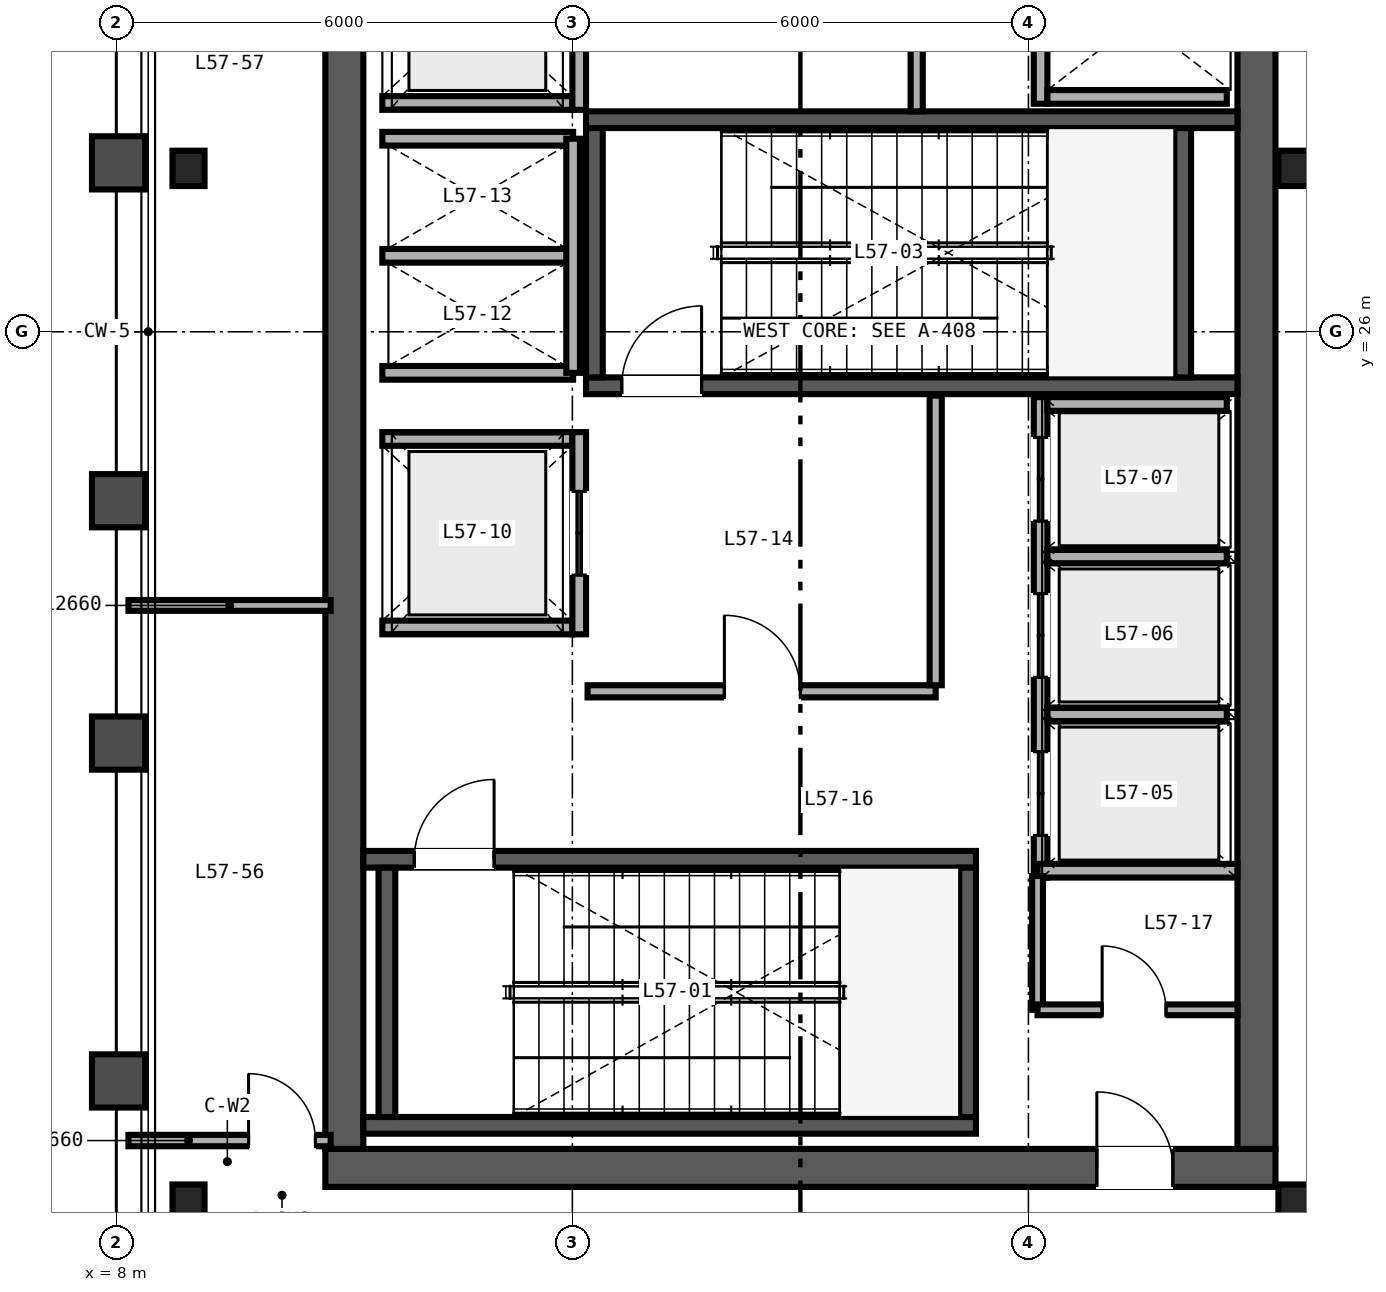
"""IFC4 building model, lengths in metres.
Left out: names, types, materials, properties, quantities, classifications, styles, units other than length and angle.
Written with IfcOpenShell. Run it as: python <this file> out.ifc"""

import sys

from ifc_helpers import new_model, si_unit, direction, frame, frame_2d, origin, origin_2d, place, context, subcontext, project, spatial, rectangle, i_section, extrude, source, transform, mapped, element, fill, save


model = new_model("IFC4")
c1 = context("Model", 3, precision=1e-05, world=origin(), true_north=direction((0.0, 1.0)))
c2 = subcontext(c1, "Body", "Model", "MODEL_VIEW")
j1 = project(units=[si_unit("LENGTHUNIT", "METRE"), si_unit("PLANEANGLEUNIT", "RADIAN")], contexts=[c1])
p1 = place(None, origin())
s1 = spatial("IfcSite", under=j1, at=p1, CompositionType="ELEMENT")
p2 = place(p1, origin())
s2 = spatial("IfcBuilding", under=s1, at=p2, CompositionType="ELEMENT")
p3 = place(p2, frame((0.0, 0.0, 228.0)))
s3 = spatial("IfcBuildingStorey", under=s2, at=p3, CompositionType="ELEMENT", Elevation=228.0)
p4 = place(p3, frame((10.75, 15.0, 0.0), z_axis=(0.0, 0.0, 1.0), x_axis=(1.0, 0.0, 0.0)))
e1 = element("IfcWall", 1, at=p4, inside=s3, PredefinedType="SHEAR", context=c2, shape_type="SweptSolid", body=[
    extrude(rectangle(XDim=12.5, YDim=0.5, at=frame_2d((6.25, 0.0))), origin(), (0.0, 0.0, 1.0), 4.58),
])
p5 = place(p4, frame((10.15, 0.0, 0.0)))
e2 = element("IfcOpeningElement", 2, at=p5, cuts=e1, PredefinedType="OPENING", context=c2, shape_type="SweptSolid", body=[
    extrude(rectangle(XDim=1.0, YDim=2.15, at=frame_2d((0.5, 1.075))), frame((0.0, 0.26, 0.0), z_axis=(0.0, -1.0, 0.0), x_axis=(1.0, 0.0, 0.0)), (0.0, 0.0, 1.0), 0.52),
])
for number, where, z_axis, x_axis in (
    (3, (11.0, 15.25, 0.0), (0.0, 0.0, 1.0), (0.0, 1.0, 0.0)),
    (4, (23.0, 15.25, 0.0), (0.0, 0.0, 1.0), (0.0, 1.0, 0.0)),
):
    element("IfcWall", number, at=place(p3, frame(where, z_axis=z_axis, x_axis=x_axis)), inside=s3, PredefinedType="SHEAR", context=c2, shape_type="SweptSolid", body=[
        extrude(rectangle(XDim=21.5, YDim=0.5, at=frame_2d((10.75, 0.0))), origin(), (0.0, 0.0, 1.0), 4.58),
    ])
p6 = place(p3, frame((11.25, 15.56, 0.0), z_axis=(0.0, 0.0, 1.0), x_axis=(1.0, 0.0, 0.0)))
e5 = element("IfcWall", 5, at=p6, inside=s3, PredefinedType="SHEAR", context=c2, shape_type="SweptSolid", body=[
    extrude(rectangle(XDim=8.06, YDim=0.22, at=frame_2d((4.03, 0.0))), origin(), (0.0, 0.0, 1.0), 4.6),
])
p7 = place(p3, frame((11.25, 19.06, 0.0), z_axis=(0.0, 0.0, 1.0), x_axis=(1.0, 0.0, 0.0)))
e6 = element("IfcWall", 6, at=p7, inside=s3, PredefinedType="SHEAR", context=c2, shape_type="SweptSolid", body=[
    extrude(rectangle(XDim=8.06, YDim=0.22, at=frame_2d((4.03, 0.0))), origin(), (0.0, 0.0, 1.0), 4.6),
])
p8 = place(p7, frame((0.67, 0.0, 0.0)))
e7 = element("IfcOpeningElement", 7, at=p8, cuts=e6, PredefinedType="OPENING", context=c2, shape_type="SweptSolid", body=[
    extrude(rectangle(XDim=1.05, YDim=2.15, at=frame_2d((0.525, 1.075))), frame((0.0, 0.12, 0.0), z_axis=(0.0, -1.0, 0.0), x_axis=(1.0, 0.0, 0.0)), (0.0, 0.0, 1.0), 0.24),
])
for number, where, z_axis, x_axis in (
    (8, (11.56, 15.67, 0.0), (0.0, 0.0, 1.0), (0.0, 1.0, 0.0)),
    (9, (19.2, 15.67, 0.0), (0.0, 0.0, 1.0), (0.0, 1.0, 0.0)),
):
    element("IfcWall", number, at=place(p3, frame(where, z_axis=z_axis, x_axis=x_axis)), inside=s3, PredefinedType="SHEAR", context=c2, shape_type="SweptSolid", body=[
        extrude(rectangle(XDim=3.28, YDim=0.22, at=frame_2d((1.64, 0.0))), origin(), (0.0, 0.0, 1.0), 4.6),
    ])
p9 = place(p3, frame((14.18, 25.29, 0.0), z_axis=(0.0, 0.0, 1.0), x_axis=(1.0, 0.0, 0.0)))
e10 = element("IfcWall", 10, at=p9, inside=s3, PredefinedType="SHEAR", context=c2, shape_type="SweptSolid", body=[
    extrude(rectangle(XDim=8.57, YDim=0.22, at=frame_2d((4.285, 0.0))), origin(), (0.0, 0.0, 1.0), 4.6),
])
p10 = place(p9, frame((0.47, 0.0, 0.0)))
e11 = element("IfcOpeningElement", 11, at=p10, cuts=e10, PredefinedType="OPENING", context=c2, shape_type="SweptSolid", body=[
    extrude(rectangle(XDim=1.05, YDim=2.15, at=frame_2d((0.525, 1.075))), frame((0.0, 0.12, 0.0), z_axis=(0.0, -1.0, 0.0), x_axis=(1.0, 0.0, 0.0)), (0.0, 0.0, 1.0), 0.24),
])
p11 = place(p3, frame((14.18, 28.79, 0.0), z_axis=(0.0, 0.0, 1.0), x_axis=(1.0, 0.0, 0.0)))
e12 = element("IfcWall", 12, at=p11, inside=s3, PredefinedType="SHEAR", context=c2, shape_type="SweptSolid", body=[
    extrude(rectangle(XDim=8.57, YDim=0.22, at=frame_2d((4.285, 0.0))), origin(), (0.0, 0.0, 1.0), 4.6),
])
for number, where, z_axis, x_axis in (
    (13, (14.29, 25.4, 0.0), (0.0, 0.0, 1.0), (0.0, 1.0, 0.0)),
    (14, (22.03, 25.4, 0.0), (0.0, 0.0, 1.0), (0.0, 1.0, 0.0)),
):
    element("IfcWall", number, at=place(p3, frame(where, z_axis=z_axis, x_axis=x_axis)), inside=s3, PredefinedType="SHEAR", context=c2, shape_type="SweptSolid", body=[
        extrude(rectangle(XDim=3.28, YDim=0.22, at=frame_2d((1.64, 0.0))), origin(), (0.0, 0.0, 1.0), 4.6),
    ])
m1 = source(origin(), c2, "Body", "SweptSolid", [
    extrude(i_section(OverallWidth=0.422, OverallDepth=0.465, WebThickness=0.045, FlangeThickness=0.073, FilletRadius=0.025, at=origin_2d()), origin(), (0.0, 0.0, 1.0), 4.58),
])
for number, where, z_axis, x_axis in (
    (15, (8.95, 14.55, 0.0), (0.0, 0.0, 1.0), (1.0, 0.0, 0.0)),
    (16, (23.5, 14.55, 0.0), (0.0, 0.0, 1.0), (1.0, 0.0, 0.0)),
    (17, (8.95, 28.15, 0.0), (0.0, 0.0, 1.0), (1.0, 0.0, 0.0)),
    (18, (23.5, 28.15, 0.0), (0.0, 0.0, 1.0), (1.0, 0.0, 0.0)),
):
    element("IfcColumn", number, at=place(p3, frame(where, z_axis=z_axis, x_axis=x_axis)), inside=s3, PredefinedType="COLUMN", context=c2, shape_type="MappedRepresentation", body=[
        mapped(m1, transform((0.0, 0.0, 0.0), scale=1.0)),
    ])
p12 = place(p3, frame((20.16, 18.82, 0.0), z_axis=(0.0, 0.0, 1.0), x_axis=(0.0, 1.0, 0.0)))
e19 = element("IfcWall", 19, at=p12, inside=s3, PredefinedType="SOLIDWALL", context=c2, shape_type="SweptSolid", body=[
    extrude(rectangle(XDim=6.32, YDim=0.18, at=frame_2d((3.16, 0.0))), origin(), (0.0, 0.0, 1.0), 3.68),
])
p13 = place(p12, frame((0.555, 0.0, 0.0)))
e20 = element("IfcOpeningElement", 20, at=p13, cuts=e19, PredefinedType="OPENING", context=c2, shape_type="SweptSolid", body=[
    extrude(rectangle(XDim=1.1, YDim=2.2, at=frame_2d((0.55, 1.1))), frame((0.0, 0.1, 0.0), z_axis=(0.0, -1.0, 0.0), x_axis=(1.0, 0.0, 0.0)), (0.0, 0.0, 1.0), 0.2),
])
p14 = place(p12, frame((2.635, 0.0, 0.0)))
e21 = element("IfcOpeningElement", 21, at=p14, cuts=e19, PredefinedType="OPENING", context=c2, shape_type="SweptSolid", body=[
    extrude(rectangle(XDim=1.1, YDim=2.2, at=frame_2d((0.55, 1.1))), frame((0.0, 0.1, 0.0), z_axis=(0.0, -1.0, 0.0), x_axis=(1.0, 0.0, 0.0)), (0.0, 0.0, 1.0), 0.2),
])
p15 = place(p12, frame((4.69, 0.0, 0.0)))
e22 = element("IfcOpeningElement", 22, at=p15, cuts=e19, PredefinedType="OPENING", context=c2, shape_type="SweptSolid", body=[
    extrude(rectangle(XDim=1.1, YDim=2.2, at=frame_2d((0.55, 1.1))), frame((0.0, 0.1, 0.0), z_axis=(0.0, -1.0, 0.0), x_axis=(1.0, 0.0, 0.0)), (0.0, 0.0, 1.0), 0.2),
])
p16 = place(p3, frame((20.12, 18.91, 0.0), z_axis=(0.0, 0.0, 1.0), x_axis=(1.0, 0.0, 0.0)))
e23 = element("IfcWall", 23, at=p16, inside=s3, PredefinedType="SOLIDWALL", context=c2, shape_type="SweptSolid", body=[
    extrude(rectangle(XDim=2.63, YDim=0.18, at=frame_2d((1.315, 0.0))), origin(), (0.0, 0.0, 1.0), 4.58),
])
p17 = place(p3, frame((20.25, 25.05, 0.0), z_axis=(0.0, 0.0, 1.0), x_axis=(1.0, 0.0, 0.0)))
e24 = element("IfcWall", 24, at=p17, inside=s3, PredefinedType="SOLIDWALL", context=c2, shape_type="SweptSolid", body=[
    extrude(rectangle(XDim=2.36, YDim=0.18, at=frame_2d((1.18, 0.0))), origin(), (0.0, 0.0, 1.0), 4.58),
])
p18 = place(p3, frame((20.25, 20.965, 0.0), z_axis=(0.0, 0.0, 1.0), x_axis=(1.0, 0.0, 0.0)))
e25 = element("IfcWall", 25, at=p18, inside=s3, PredefinedType="SOLIDWALL", context=c2, shape_type="SweptSolid", body=[
    extrude(rectangle(XDim=2.36, YDim=0.18, at=frame_2d((1.18, 0.0))), origin(), (0.0, 0.0, 1.0), 3.68),
])
p19 = place(p3, frame((20.25, 23.045, 0.0), z_axis=(0.0, 0.0, 1.0), x_axis=(1.0, 0.0, 0.0)))
e26 = element("IfcWall", 26, at=p19, inside=s3, PredefinedType="SOLIDWALL", context=c2, shape_type="SweptSolid", body=[
    extrude(rectangle(XDim=2.36, YDim=0.18, at=frame_2d((1.18, 0.0))), origin(), (0.0, 0.0, 1.0), 4.58),
])
p20 = place(p3, frame((20.16, 29.0, 0.0), z_axis=(0.0, 0.0, 1.0), x_axis=(0.0, 1.0, 0.0)))
e27 = element("IfcWall", 27, at=p20, inside=s3, PredefinedType="SOLIDWALL", context=c2, shape_type="SweptSolid", body=[
    extrude(rectangle(XDim=4.29, YDim=0.18, at=frame_2d((2.145, 0.0))), origin(), (0.0, 0.0, 1.0), 4.58),
])
p21 = place(p3, frame((20.25, 29.09, 0.0), z_axis=(0.0, 0.0, 1.0), x_axis=(1.0, 0.0, 0.0)))
e28 = element("IfcWall", 28, at=p21, inside=s3, PredefinedType="SOLIDWALL", context=c2, shape_type="SweptSolid", body=[
    extrude(rectangle(XDim=2.36, YDim=0.18, at=frame_2d((1.18, 0.0))), origin(), (0.0, 0.0, 1.0), 4.58),
])
for number, where, z_axis, x_axis in (
    (29, (11.5, 22.11, 0.0), (0.0, 0.0, 1.0), (1.0, 0.0, 0.0)),
    (30, (11.5, 24.59, 0.0), (0.0, 0.0, 1.0), (1.0, 0.0, 0.0)),
):
    element("IfcWall", number, at=place(p3, frame(where, z_axis=z_axis, x_axis=x_axis)), inside=s3, PredefinedType="SOLIDWALL", context=c2, shape_type="SweptSolid", body=[
        extrude(rectangle(XDim=2.5, YDim=0.18, at=frame_2d((1.25, 0.0))), origin(), (0.0, 0.0, 1.0), 4.58),
    ])
p22 = place(p3, frame((14.09, 22.02, 0.0), z_axis=(0.0, 0.0, 1.0), x_axis=(0.0, 1.0, 0.0)))
e31 = element("IfcWall", 31, at=p22, inside=s3, PredefinedType="SOLIDWALL", context=c2, shape_type="SweptSolid", body=[
    extrude(rectangle(XDim=2.66, YDim=0.18, at=frame_2d((1.33, 0.0))), origin(), (0.0, 0.0, 1.0), 4.58),
])
p23 = place(p22, frame((0.78, 0.0, 0.0)))
e32 = element("IfcOpeningElement", 32, at=p23, cuts=e31, PredefinedType="OPENING", context=c2, shape_type="SweptSolid", body=[
    extrude(rectangle(XDim=1.1, YDim=2.2, at=frame_2d((0.55, 1.1))), frame((0.0, 0.1, 0.0), z_axis=(0.0, -1.0, 0.0), x_axis=(1.0, 0.0, 0.0)), (0.0, 0.0, 1.0), 0.2),
])
p24 = place(p3, frame((11.5, 29.01, 0.0), z_axis=(0.0, 0.0, 1.0), x_axis=(1.0, 0.0, 0.0)))
e33 = element("IfcWall", 33, at=p24, inside=s3, PredefinedType="SOLIDWALL", context=c2, shape_type="SweptSolid", body=[
    extrude(rectangle(XDim=2.5, YDim=0.18, at=frame_2d((1.25, 0.0))), origin(), (0.0, 0.0, 1.0), 4.58),
])
p25 = place(p3, frame((14.09, 28.92, 0.0), z_axis=(0.0, 0.0, 1.0), x_axis=(0.0, 1.0, 0.0)))
e34 = element("IfcWall", 34, at=p25, inside=s3, PredefinedType="SOLIDWALL", context=c2, shape_type="SweptSolid", body=[
    extrude(rectangle(XDim=2.66, YDim=0.18, at=frame_2d((1.33, 0.0))), origin(), (0.0, 0.0, 1.0), 4.58),
])
p26 = place(p25, frame((0.78, 0.0, 0.0)))
e35 = element("IfcOpeningElement", 35, at=p26, cuts=e34, PredefinedType="OPENING", context=c2, shape_type="SweptSolid", body=[
    extrude(rectangle(XDim=1.1, YDim=2.2, at=frame_2d((0.55, 1.1))), frame((0.0, 0.1, 0.0), z_axis=(0.0, -1.0, 0.0), x_axis=(1.0, 0.0, 0.0)), (0.0, 0.0, 1.0), 0.2),
])
for number, where, z_axis, x_axis in (
    (36, (11.5, 25.46, 0.0), (0.0, 0.0, 1.0), (1.0, 0.0, 0.0)),
    (37, (11.5, 27.0, 0.0), (0.0, 0.0, 1.0), (1.0, 0.0, 0.0)),
    (38, (11.5, 28.54, 0.0), (0.0, 0.0, 1.0), (1.0, 0.0, 0.0)),
):
    element("IfcWall", number, at=place(p3, frame(where, z_axis=z_axis, x_axis=x_axis)), inside=s3, PredefinedType="SOLIDWALL", context=c2, shape_type="SweptSolid", body=[
        extrude(rectangle(XDim=2.51, YDim=0.18, at=frame_2d((1.255, 0.0))), origin(), (0.0, 0.0, 1.0), 4.58),
    ])
p27 = place(p3, frame((14.01, 25.46, 0.0), z_axis=(0.0, 0.0, 1.0), x_axis=(0.0, 1.0, 0.0)))
e39 = element("IfcWall", 39, at=p27, inside=s3, PredefinedType="SOLIDWALL", context=c2, shape_type="SweptSolid", body=[
    extrude(rectangle(XDim=3.08, YDim=0.18, at=frame_2d((1.54, 0.0))), origin(), (0.0, 0.0, 1.0), 4.58),
])
p28 = place(p3, frame((14.2, 21.27, 0.0), z_axis=(0.0, 0.0, 1.0), x_axis=(1.0, 0.0, 0.0)))
e40 = element("IfcWall", 40, at=p28, inside=s3, PredefinedType="PARTITIONING", context=c2, shape_type="SweptSolid", body=[
    extrude(rectangle(XDim=4.58, YDim=0.16, at=frame_2d((2.29, 0.0))), origin(), (0.0, 0.0, 1.0), 4.58),
])
p29 = place(p28, frame((1.8, 0.0, 0.0)))
e41 = element("IfcOpeningElement", 41, at=p29, cuts=e40, PredefinedType="OPENING", context=c2, shape_type="SweptSolid", body=[
    extrude(rectangle(XDim=1.0, YDim=2.15, at=frame_2d((0.5, 1.075))), frame((0.0, 0.09, 0.0), z_axis=(0.0, -1.0, 0.0), x_axis=(1.0, 0.0, 0.0)), (0.0, 0.0, 1.0), 0.18),
])
p30 = place(p3, frame((18.78, 21.35, 0.0), z_axis=(0.0, 0.0, 1.0), x_axis=(0.0, 1.0, 0.0)))
e42 = element("IfcWall", 42, at=p30, inside=s3, PredefinedType="PARTITIONING", context=c2, shape_type="SweptSolid", body=[
    extrude(rectangle(XDim=3.81, YDim=0.16, at=frame_2d((1.905, 0.0))), origin(), (0.0, 0.0, 1.0), 4.58),
])
p31 = place(p3, frame((18.53, 28.9, 0.0), z_axis=(0.0, 0.0, 1.0), x_axis=(0.0, 1.0, 0.0)))
e43 = element("IfcWall", 43, at=p31, inside=s3, PredefinedType="PARTITIONING", context=c2, shape_type="SweptSolid", body=[
    extrude(rectangle(XDim=3.9, YDim=0.16, at=frame_2d((1.95, 0.0))), origin(), (0.0, 0.0, 1.0), 4.58),
])
p32 = place(p31, frame((1.5, 0.0, 0.0)))
e44 = element("IfcOpeningElement", 44, at=p32, cuts=e43, PredefinedType="OPENING", context=c2, shape_type="SweptSolid", body=[
    extrude(rectangle(XDim=1.0, YDim=2.15, at=frame_2d((0.5, 1.075))), frame((0.0, 0.09, 0.0), z_axis=(0.0, -1.0, 0.0), x_axis=(1.0, 0.0, 0.0)), (0.0, 0.0, 1.0), 0.18),
])
p33 = place(p3, frame((20.12, 17.08, 0.0), z_axis=(0.0, 0.0, 1.0), x_axis=(0.0, 1.0, 0.0)))
e45 = element("IfcWall", 45, at=p33, inside=s3, PredefinedType="PARTITIONING", context=c2, shape_type="SweptSolid", body=[
    extrude(rectangle(XDim=1.76, YDim=0.142, at=frame_2d((0.88, 0.0))), origin(), (0.0, 0.0, 1.0), 4.58),
])
p34 = place(p3, frame((20.12, 17.08, 0.0), z_axis=(0.0, 0.0, 1.0), x_axis=(1.0, 0.0, 0.0)))
e46 = element("IfcWall", 46, at=p34, inside=s3, PredefinedType="PARTITIONING", context=c2, shape_type="SweptSolid", body=[
    extrude(rectangle(XDim=2.63, YDim=0.142, at=frame_2d((1.315, 0.0))), origin(), (0.0, 0.0, 1.0), 4.58),
])
p35 = place(p34, frame((0.85, 0.0, 0.0)))
e47 = element("IfcOpeningElement", 47, at=p35, cuts=e46, PredefinedType="OPENING", context=c2, shape_type="SweptSolid", body=[
    extrude(rectangle(XDim=0.84, YDim=2.1, at=frame_2d((0.42, 1.05))), frame((0.0, 0.081, 0.0), z_axis=(0.0, -1.0, 0.0), x_axis=(1.0, 0.0, 0.0)), (0.0, 0.0, 1.0), 0.162),
])
p36 = place(p3, frame((8.16, 15.36, 0.0), z_axis=(0.0, 0.0, 1.0), x_axis=(1.0, 0.0, 0.0)))
e48 = element("IfcWall", 48, at=p36, inside=s3, PredefinedType="PARTITIONING", context=c2, shape_type="SweptSolid", body=[
    extrude(rectangle(XDim=2.66, YDim=0.15, at=frame_2d((1.33, 0.0))), origin(), (0.0, 0.0, 1.0), 3.801),
])
p37 = place(p36, frame((1.58, 0.0, 0.0)))
e49 = element("IfcOpeningElement", 49, at=p37, cuts=e48, PredefinedType="OPENING", context=c2, shape_type="SweptSolid", body=[
    extrude(rectangle(XDim=0.88, YDim=2.15, at=frame_2d((0.44, 1.075))), frame((0.0, 0.085, 0.0), z_axis=(0.0, -1.0, 0.0), x_axis=(1.0, 0.0, 0.0)), (0.0, 0.0, 1.0), 0.17),
])
p38 = place(p3, frame((8.16, 22.4, 0.0), z_axis=(0.0, 0.0, 1.0), x_axis=(1.0, 0.0, 0.0)))
e50 = element("IfcWall", 50, at=p38, inside=s3, PredefinedType="PARTITIONING", context=c2, shape_type="SweptSolid", body=[
    extrude(rectangle(XDim=2.66, YDim=0.142, at=frame_2d((1.33, 0.0))), origin(), (0.0, 0.0, 1.0), 3.801),
])
m2 = source(origin(), c2, "Body", "SweptSolid", [
    extrude(rectangle(XDim=1.05, YDim=2.15, at=frame_2d((0.525, 1.075))), frame((0.0, 0.025, 0.0), z_axis=(0.0, -1.0, 0.0), x_axis=(1.0, 0.0, 0.0)), (0.0, 0.0, 1.0), 0.05),
])
p39 = place(p8, origin())
e51 = element("IfcDoor", 51, at=p39, inside=s3, OperationType="SINGLE_SWING_RIGHT", PredefinedType="DOOR", context=c2, shape_type="MappedRepresentation", body=[
    mapped(m2, transform((0.0, 0.0, 0.0), scale=1.0)),
])
fill(e7, e51)
p40 = place(p10, origin())
e52 = element("IfcDoor", 52, at=p40, inside=s3, OperationType="SINGLE_SWING_RIGHT", PredefinedType="DOOR", context=c2, shape_type="MappedRepresentation", body=[
    mapped(m2, transform((0.0, 0.0, 0.0), scale=1.0)),
])
fill(e11, e52)
m3 = source(origin(), c2, "Body", "SweptSolid", [
    extrude(rectangle(XDim=1.1, YDim=2.2, at=frame_2d((0.55, 1.1))), frame((0.0, 0.025, 0.0), z_axis=(0.0, -1.0, 0.0), x_axis=(1.0, 0.0, 0.0)), (0.0, 0.0, 1.0), 0.05),
])
p41 = place(p13, origin())
e53 = element("IfcDoor", 53, at=p41, inside=s3, OperationType="DOUBLE_DOOR_SLIDING", PredefinedType="DOOR", context=c2, shape_type="MappedRepresentation", body=[
    mapped(m3, transform((0.0, 0.0, 0.0), scale=1.0)),
])
fill(e20, e53)
p42 = place(p14, origin())
e54 = element("IfcDoor", 54, at=p42, inside=s3, OperationType="DOUBLE_DOOR_SLIDING", PredefinedType="DOOR", context=c2, shape_type="MappedRepresentation", body=[
    mapped(m3, transform((0.0, 0.0, 0.0), scale=1.0)),
])
fill(e21, e54)
p43 = place(p15, origin())
e55 = element("IfcDoor", 55, at=p43, inside=s3, OperationType="DOUBLE_DOOR_SLIDING", PredefinedType="DOOR", context=c2, shape_type="MappedRepresentation", body=[
    mapped(m3, transform((0.0, 0.0, 0.0), scale=1.0)),
])
fill(e22, e55)
p44 = place(p23, origin())
e56 = element("IfcDoor", 56, at=p44, inside=s3, OperationType="DOUBLE_DOOR_SLIDING", PredefinedType="DOOR", context=c2, shape_type="MappedRepresentation", body=[
    mapped(m3, transform((0.0, 0.0, 0.0), scale=1.0)),
])
fill(e32, e56)
m4 = source(origin(), c2, "Body", "SweptSolid", [
    extrude(rectangle(XDim=1.0, YDim=2.15, at=frame_2d((0.5, 1.075))), frame((0.0, 0.025, 0.0), z_axis=(0.0, -1.0, 0.0), x_axis=(1.0, 0.0, 0.0)), (0.0, 0.0, 1.0), 0.05),
])
p45 = place(p29, origin())
e57 = element("IfcDoor", 57, at=p45, inside=s3, OperationType="SINGLE_SWING_LEFT", PredefinedType="DOOR", context=c2, shape_type="MappedRepresentation", body=[
    mapped(m4, transform((0.0, 0.0, 0.0), scale=1.0)),
])
fill(e41, e57)
m5 = source(origin(), c2, "Body", "SweptSolid", [
    extrude(rectangle(XDim=0.84, YDim=2.1, at=frame_2d((0.42, 1.05))), frame((0.0, 0.025, 0.0), z_axis=(0.0, -1.0, 0.0), x_axis=(1.0, 0.0, 0.0)), (0.0, 0.0, 1.0), 0.05),
])
p46 = place(p35, origin())
e58 = element("IfcDoor", 58, at=p46, inside=s3, OperationType="SINGLE_SWING_LEFT", PredefinedType="DOOR", context=c2, shape_type="MappedRepresentation", body=[
    mapped(m5, transform((0.0, 0.0, 0.0), scale=1.0)),
])
fill(e47, e58)
p47 = place(p5, origin())
e59 = element("IfcDoor", 59, at=p47, inside=s3, OperationType="SINGLE_SWING_LEFT", PredefinedType="DOOR", context=c2, shape_type="MappedRepresentation", body=[
    mapped(m4, transform((0.0, 0.0, 0.0), scale=1.0)),
])
fill(e2, e59)
m6 = source(origin(), c2, "Body", "SweptSolid", [
    extrude(rectangle(XDim=0.88, YDim=2.15, at=frame_2d((0.44, 1.075))), frame((0.0, 0.025, 0.0), z_axis=(0.0, -1.0, 0.0), x_axis=(1.0, 0.0, 0.0)), (0.0, 0.0, 1.0), 0.05),
])
p48 = place(p37, origin())
e60 = element("IfcDoor", 60, at=p48, inside=s3, OperationType="SINGLE_SWING_LEFT", PredefinedType="DOOR", context=c2, shape_type="MappedRepresentation", body=[
    mapped(m6, transform((0.0, 0.0, 0.0), scale=1.0)),
])
fill(e49, e60)
save(model, sys.argv[1])
